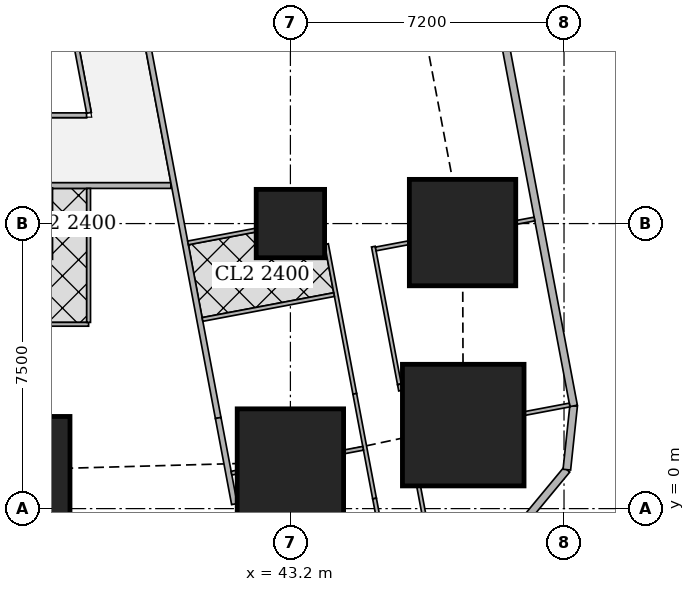
"""IFC4 building model, lengths in metres.
Left out: names, types, materials, properties, quantities, classifications, styles, units other than length and angle.
Written with IfcOpenShell. Run it as: python <this file> out.ifc"""

import sys

from ifc_helpers import new_model, si_unit, direction, frame, frame_2d, origin, origin_2d, place, context, subcontext, project, spatial, rectangle, extrude, element, fill, save


model = new_model("IFC4")
c1 = context("Model", 3, precision=1e-05, world=origin(), true_north=direction((0.0, 1.0)))
c2 = subcontext(c1, "Body", "Model", "MODEL_VIEW")
j1 = project(units=[si_unit("LENGTHUNIT", "METRE"), si_unit("PLANEANGLEUNIT", "RADIAN")], contexts=[c1])
p1 = place(None, origin())
s1 = spatial("IfcSite", under=j1, at=p1, CompositionType="ELEMENT")
p2 = place(p1, origin())
s2 = spatial("IfcBuilding", under=s1, at=p2, CompositionType="ELEMENT")
p3 = place(p2, frame((0.0, 0.0, 42.5)))
s3 = spatial("IfcBuildingStorey", under=s2, at=p3, CompositionType="ELEMENT", Elevation=42.5)
for number, where, z_axis, x_axis in (
    (1, (36.0, 1.025, 0.0), (0.0, 0.0, 1.0), (1.0, 0.0, 0.0)),
    (2, (43.2, 1.225, 0.0), (0.0, 0.0, 1.0), (1.0, 0.0, 0.0)),
):
    element("IfcColumn", number, at=place(p3, frame(where, z_axis=z_axis, x_axis=x_axis)), inside=s3, PredefinedType="COLUMN", context=c2, shape_type="SweptSolid", body=[
        extrude(rectangle(XDim=2.8, YDim=2.8, at=origin_2d()), origin(), (0.0, 0.0, 1.0), 3.75),
    ])
p4 = place(p3, frame((47.748, 2.197, 0.0), z_axis=(0.0, 0.0, 1.0), x_axis=(1.0, 0.0, 0.0)))
e3 = element("IfcColumn", 3, at=p4, inside=s3, PredefinedType="COLUMN", context=c2, shape_type="SweptSolid", body=[
    extrude(rectangle(XDim=3.2, YDim=3.2, at=origin_2d()), origin(), (0.0, 0.0, 1.0), 3.75),
])
p5 = place(p3, frame((43.2, 7.5, 0.0), z_axis=(0.0, 0.0, 1.0), x_axis=(1.0, 0.0, 0.0)))
e4 = element("IfcColumn", 4, at=p5, inside=s3, PredefinedType="COLUMN", context=c2, shape_type="SweptSolid", body=[
    extrude(rectangle(XDim=1.8, YDim=1.8, at=origin_2d()), origin(), (0.0, 0.0, 1.0), 3.75),
])
p6 = place(p3, frame((47.73, 7.263, 0.0), z_axis=(0.0, 0.0, 1.0), x_axis=(1.0, 0.0, 0.0)))
e5 = element("IfcColumn", 5, at=p6, inside=s3, PredefinedType="COLUMN", context=c2, shape_type="SweptSolid", body=[
    extrude(rectangle(XDim=2.8, YDim=2.8, at=origin_2d()), origin(), (0.0, 0.0, 1.0), 3.75),
])
p7 = place(p3, frame((49.407, -0.263, 0.0), z_axis=(0.0, 0.0, 1.0), x_axis=(0.638042593423, 0.770001070764, 0.0)))
e6 = element("IfcWall", 6, at=p7, inside=s3, PredefinedType="SOLIDWALL", context=c2, shape_type="SweptSolid", body=[
    extrude(rectangle(XDim=1.673, YDim=0.2, at=frame_2d((0.836, 0.0))), origin(), (0.0, 0.0, 1.0), 3.5),
])
p8 = place(p3, frame((50.474, 1.025, 0.0), z_axis=(0.0, 0.0, 1.0), x_axis=(0.106047815515, 0.994361031429, 0.0)))
e7 = element("IfcWall", 7, at=p8, inside=s3, PredefinedType="SOLIDWALL", context=c2, shape_type="SweptSolid", body=[
    extrude(rectangle(XDim=1.688, YDim=0.2, at=frame_2d((0.844, 0.0))), origin(), (0.0, 0.0, 1.0), 3.5),
])
p9 = place(p3, frame((50.653, 2.703, 0.0), z_axis=(0.0, 0.0, 1.0), x_axis=(-0.185612026696, 0.982623109613, 0.0)))
e8 = element("IfcWall", 8, at=p9, inside=s3, PredefinedType="SOLIDWALL", context=c2, shape_type="SweptSolid", body=[
    extrude(rectangle(XDim=41.393, YDim=0.2, at=frame_2d((20.697, 0.0))), origin(), (0.0, 0.0, 1.0), 3.5),
])
p10 = place(p9, frame((1.633, 0.0, 0.9)))
e9 = element("IfcOpeningElement", 9, at=p10, cuts=e8, PredefinedType="OPENING", context=c2, shape_type="SweptSolid", body=[
    extrude(rectangle(XDim=1.8, YDim=1.5, at=frame_2d((0.9, 0.75))), frame((0.0, 0.11, 0.0), z_axis=(0.0, -1.0, 0.0), x_axis=(1.0, 0.0, 0.0)), (0.0, 0.0, 1.0), 0.22),
])
p11 = place(p9, frame((6.032, 0.0, 0.9)))
e10 = element("IfcOpeningElement", 10, at=p11, cuts=e8, PredefinedType="OPENING", context=c2, shape_type="SweptSolid", body=[
    extrude(rectangle(XDim=1.8, YDim=1.5, at=frame_2d((0.9, 0.75))), frame((0.0, 0.11, 0.0), z_axis=(0.0, -1.0, 0.0), x_axis=(1.0, 0.0, 0.0)), (0.0, 0.0, 1.0), 0.22),
])
p12 = place(p9, frame((9.848, 0.0, 0.9)))
e11 = element("IfcOpeningElement", 11, at=p12, cuts=e8, PredefinedType="OPENING", context=c2, shape_type="SweptSolid", body=[
    extrude(rectangle(XDim=1.8, YDim=1.5, at=frame_2d((0.9, 0.75))), frame((0.0, 0.11, 0.0), z_axis=(0.0, -1.0, 0.0), x_axis=(1.0, 0.0, 0.0)), (0.0, 0.0, 1.0), 0.22),
])
p13 = place(p9, frame((17.481, 0.0, 0.9)))
e12 = element("IfcOpeningElement", 12, at=p13, cuts=e8, PredefinedType="OPENING", context=c2, shape_type="SweptSolid", body=[
    extrude(rectangle(XDim=1.8, YDim=1.5, at=frame_2d((0.9, 0.75))), frame((0.0, 0.11, 0.0), z_axis=(0.0, -1.0, 0.0), x_axis=(1.0, 0.0, 0.0)), (0.0, 0.0, 1.0), 0.22),
])
p14 = place(p9, frame((21.297, 0.0, 0.9)))
e13 = element("IfcOpeningElement", 13, at=p14, cuts=e8, PredefinedType="OPENING", context=c2, shape_type="SweptSolid", body=[
    extrude(rectangle(XDim=1.8, YDim=1.5, at=frame_2d((0.9, 0.75))), frame((0.0, 0.11, 0.0), z_axis=(0.0, -1.0, 0.0), x_axis=(1.0, 0.0, 0.0)), (0.0, 0.0, 1.0), 0.22),
])
p15 = place(p9, frame((25.113, 0.0, 0.9)))
e14 = element("IfcOpeningElement", 14, at=p15, cuts=e8, PredefinedType="OPENING", context=c2, shape_type="SweptSolid", body=[
    extrude(rectangle(XDim=1.8, YDim=1.5, at=frame_2d((0.9, 0.75))), frame((0.0, 0.11, 0.0), z_axis=(0.0, -1.0, 0.0), x_axis=(1.0, 0.0, 0.0)), (0.0, 0.0, 1.0), 0.22),
])
p16 = place(p9, frame((28.93, 0.0, 0.9)))
e15 = element("IfcOpeningElement", 15, at=p16, cuts=e8, PredefinedType="OPENING", context=c2, shape_type="SweptSolid", body=[
    extrude(rectangle(XDim=1.8, YDim=1.5, at=frame_2d((0.9, 0.75))), frame((0.0, 0.11, 0.0), z_axis=(0.0, -1.0, 0.0), x_axis=(1.0, 0.0, 0.0)), (0.0, 0.0, 1.0), 0.22),
])
p17 = place(p9, frame((32.746, 0.0, 0.9)))
e16 = element("IfcOpeningElement", 16, at=p17, cuts=e8, PredefinedType="OPENING", context=c2, shape_type="SweptSolid", body=[
    extrude(rectangle(XDim=1.8, YDim=1.5, at=frame_2d((0.9, 0.75))), frame((0.0, 0.11, 0.0), z_axis=(0.0, -1.0, 0.0), x_axis=(1.0, 0.0, 0.0)), (0.0, 0.0, 1.0), 0.22),
])
p18 = place(p9, frame((36.481, 0.0, 0.9)))
e17 = element("IfcOpeningElement", 17, at=p18, cuts=e8, PredefinedType="OPENING", context=c2, shape_type="SweptSolid", body=[
    extrude(rectangle(XDim=1.8, YDim=1.5, at=frame_2d((0.9, 0.75))), frame((0.0, 0.11, 0.0), z_axis=(0.0, -1.0, 0.0), x_axis=(1.0, 0.0, 0.0)), (0.0, 0.0, 1.0), 0.22),
])
p19 = place(p3, frame((40.054, 8.5, 0.0), z_axis=(0.0, 0.0, 1.0), x_axis=(-1.0, 0.0, 0.0)))
e18 = element("IfcWall", 18, at=p19, inside=s3, PredefinedType="SOLIDWALL", context=c2, shape_type="SweptSolid", body=[
    extrude(rectangle(XDim=31.704, YDim=0.15, at=frame_2d((15.852, 0.0))), origin(), (0.0, 0.0, 1.0), 3.5),
])
p20 = place(p19, frame((27.321, 0.0, 0.0)))
e19 = element("IfcOpeningElement", 19, at=p20, cuts=e18, PredefinedType="OPENING", context=c2, shape_type="SweptSolid", body=[
    extrude(rectangle(XDim=1.0, YDim=2.1, at=frame_2d((0.5, 1.05))), frame((0.0, 0.085, 0.0), z_axis=(0.0, -1.0, 0.0), x_axis=(1.0, 0.0, 0.0)), (0.0, 0.0, 1.0), 0.17),
])
p21 = place(p19, frame((23.054, 0.0, 0.0)))
e20 = element("IfcOpeningElement", 20, at=p21, cuts=e18, PredefinedType="OPENING", context=c2, shape_type="SweptSolid", body=[
    extrude(rectangle(XDim=1.0, YDim=2.1, at=frame_2d((0.5, 1.05))), frame((0.0, 0.085, 0.0), z_axis=(0.0, -1.0, 0.0), x_axis=(1.0, 0.0, 0.0)), (0.0, 0.0, 1.0), 0.17),
])
p22 = place(p19, frame((15.854, 0.0, 0.0)))
e21 = element("IfcOpeningElement", 21, at=p22, cuts=e18, PredefinedType="OPENING", context=c2, shape_type="SweptSolid", body=[
    extrude(rectangle(XDim=1.0, YDim=2.1, at=frame_2d((0.5, 1.05))), frame((0.0, 0.085, 0.0), z_axis=(0.0, -1.0, 0.0), x_axis=(1.0, 0.0, 0.0)), (0.0, 0.0, 1.0), 0.17),
])
p23 = place(p19, frame((8.654, 0.0, 0.0)))
e22 = element("IfcOpeningElement", 22, at=p23, cuts=e18, PredefinedType="OPENING", context=c2, shape_type="SweptSolid", body=[
    extrude(rectangle(XDim=1.0, YDim=2.1, at=frame_2d((0.5, 1.05))), frame((0.0, 0.085, 0.0), z_axis=(0.0, -1.0, 0.0), x_axis=(1.0, 0.0, 0.0)), (0.0, 0.0, 1.0), 0.17),
])
p24 = place(p19, frame((0.15, 0.0, 0.0)))
e23 = element("IfcOpeningElement", 23, at=p24, cuts=e18, PredefinedType="OPENING", context=c2, shape_type="SweptSolid", body=[
    extrude(rectangle(XDim=1.0, YDim=2.1, at=frame_2d((0.5, 1.05))), frame((0.0, 0.085, 0.0), z_axis=(0.0, -1.0, 0.0), x_axis=(1.0, 0.0, 0.0)), (0.0, 0.0, 1.0), 0.17),
])
p25 = place(p3, frame((33.68, 42.723, 0.0), z_axis=(0.0, 0.0, 1.0), x_axis=(0.185624129307, -0.98262082342, 0.0)))
e24 = element("IfcWall", 24, at=p25, inside=s3, PredefinedType="SOLIDWALL", context=c2, shape_type="SweptSolid", body=[
    extrude(rectangle(XDim=41.051, YDim=0.15, at=frame_2d((20.526, 0.0))), origin(), (0.0, 0.0, 1.0), 2.5),
])
p26 = place(p25, frame((7.73, 0.0, 0.0)))
e25 = element("IfcOpeningElement", 25, at=p26, cuts=e24, PredefinedType="OPENING", context=c2, shape_type="SweptSolid", body=[
    extrude(rectangle(XDim=1.0, YDim=2.1, at=frame_2d((0.5, 1.05))), frame((0.0, 0.085, 0.0), z_axis=(0.0, -1.0, 0.0), x_axis=(1.0, 0.0, 0.0)), (0.0, 0.0, 1.0), 0.17),
])
p27 = place(p25, frame((12.307, 0.0, 0.0)))
e26 = element("IfcOpeningElement", 26, at=p27, cuts=e24, PredefinedType="OPENING", context=c2, shape_type="SweptSolid", body=[
    extrude(rectangle(XDim=1.0, YDim=2.1, at=frame_2d((0.5, 1.05))), frame((0.0, 0.085, 0.0), z_axis=(0.0, -1.0, 0.0), x_axis=(1.0, 0.0, 0.0)), (0.0, 0.0, 1.0), 0.17),
])
p28 = place(p25, frame((19.938, 0.0, 0.0)))
e27 = element("IfcOpeningElement", 27, at=p28, cuts=e24, PredefinedType="OPENING", context=c2, shape_type="SweptSolid", body=[
    extrude(rectangle(XDim=1.0, YDim=2.1, at=frame_2d((0.5, 1.05))), frame((0.0, 0.085, 0.0), z_axis=(0.0, -1.0, 0.0), x_axis=(1.0, 0.0, 0.0)), (0.0, 0.0, 1.0), 0.17),
])
p29 = place(p25, frame((32.193, 0.0, 0.0)))
e28 = element("IfcOpeningElement", 28, at=p29, cuts=e24, PredefinedType="OPENING", context=c2, shape_type="SweptSolid", body=[
    extrude(rectangle(XDim=1.0, YDim=2.1, at=frame_2d((0.5, 1.05))), frame((0.0, 0.085, 0.0), z_axis=(0.0, -1.0, 0.0), x_axis=(1.0, 0.0, 0.0)), (0.0, 0.0, 1.0), 0.17),
])
p30 = place(p3, frame((41.3, 2.385, 0.0), z_axis=(0.0, 0.0, 1.0), x_axis=(0.185170596553, -0.982706390624, 0.0)))
e29 = element("IfcWall", 29, at=p30, inside=s3, PredefinedType="SOLIDWALL", context=c2, shape_type="SweptSolid", body=[
    extrude(rectangle(XDim=2.306, YDim=0.15, at=frame_2d((1.153, 0.0))), origin(), (0.0, 0.0, 1.0), 2.05),
])
p31 = place(p3, frame((37.89, 4.85, 0.0), z_axis=(0.0, 0.0, 1.0), x_axis=(-1.0, 0.0, 0.0)))
e30 = element("IfcWall", 30, at=p31, inside=s3, PredefinedType="PARTITIONING", context=c2, shape_type="SweptSolid", body=[
    extrude(rectangle(XDim=1.765, YDim=0.1, at=frame_2d((0.882, 0.0))), origin(), (0.0, 0.0, 1.0), 3.5),
])
p32 = place(p31, frame((0.49, 0.0, 0.0)))
e31 = element("IfcOpeningElement", 31, at=p32, cuts=e30, PredefinedType="OPENING", context=c2, shape_type="SweptSolid", body=[
    extrude(rectangle(XDim=0.9, YDim=2.1, at=frame_2d((0.45, 1.05))), frame((0.0, 0.06, 0.0), z_axis=(0.0, -1.0, 0.0), x_axis=(1.0, 0.0, 0.0)), (0.0, 0.0, 1.0), 0.12),
])
p33 = place(p3, frame((37.89, 4.9, 0.0), z_axis=(0.0, 0.0, 1.0), x_axis=(0.0, 1.0, 0.0)))
e32 = element("IfcWall", 32, at=p33, inside=s3, PredefinedType="PARTITIONING", context=c2, shape_type="SweptSolid", body=[
    extrude(rectangle(XDim=3.525, YDim=0.1, at=frame_2d((1.763, 0.0))), origin(), (0.0, 0.0, 1.0), 3.5),
])
p34 = place(p3, frame((45.383, 6.894, 0.0), z_axis=(0.0, 0.0, 1.0), x_axis=(0.185791461635, -0.982589198385, 0.0)))
e33 = element("IfcWall", 33, at=p34, inside=s3, PredefinedType="PARTITIONING", context=c2, shape_type="SweptSolid", body=[
    extrude(rectangle(XDim=3.687, YDim=0.1, at=frame_2d((1.844, 0.0))), origin(), (0.0, 0.0, 1.0), 3.5),
])
p35 = place(p34, frame((1.3, 0.0, 0.0)))
e34 = element("IfcOpeningElement", 34, at=p35, cuts=e33, PredefinedType="OPENING", context=c2, shape_type="SweptSolid", body=[
    extrude(rectangle(XDim=0.9, YDim=2.1, at=frame_2d((0.45, 1.05))), frame((0.0, 0.06, 0.0), z_axis=(0.0, -1.0, 0.0), x_axis=(1.0, 0.0, 0.0)), (0.0, 0.0, 1.0), 0.12),
])
p36 = place(p3, frame((46.068, 3.271, 0.0), z_axis=(0.0, 0.0, 1.0), x_axis=(0.183590240121, -0.98300286049, 0.0)))
e35 = element("IfcWall", 35, at=p36, inside=s3, PredefinedType="PARTITIONING", context=c2, shape_type="SweptSolid", body=[
    extrude(rectangle(XDim=0.169, YDim=0.1, at=frame_2d((0.084, 0.0))), origin(), (0.0, 0.0, 1.0), 2.05),
])
p37 = place(p3, frame((46.574, 0.587, 0.0), z_axis=(0.0, 0.0, 1.0), x_axis=(0.185997942803, -0.98255013372, 0.0)))
e36 = element("IfcWall", 36, at=p37, inside=s3, PredefinedType="PARTITIONING", context=c2, shape_type="SweptSolid", body=[
    extrude(rectangle(XDim=1.259, YDim=0.1, at=frame_2d((0.629, 0.0))), origin(), (0.0, 0.0, 1.0), 2.05),
])
p38 = place(p3, frame((44.149, 6.96, 0.0), z_axis=(0.0, 0.0, 1.0), x_axis=(0.185824941804, -0.982582867245, 0.0)))
e37 = element("IfcWall", 37, at=p38, inside=s3, PredefinedType="PARTITIONING", context=c2, shape_type="SweptSolid", body=[
    extrude(rectangle(XDim=4.01, YDim=0.1, at=frame_2d((2.005, 0.0))), origin(), (0.0, 0.0, 1.0), 3.5),
])
p39 = place(p38, frame((0.2, 0.0, 0.0)))
e38 = element("IfcOpeningElement", 38, at=p39, cuts=e37, PredefinedType="OPENING", context=c2, shape_type="SweptSolid", body=[
    extrude(rectangle(XDim=0.9, YDim=2.1, at=frame_2d((0.45, 1.05))), frame((0.0, 0.06, 0.0), z_axis=(0.0, -1.0, 0.0), x_axis=(1.0, 0.0, 0.0)), (0.0, 0.0, 1.0), 0.12),
])
p40 = place(p38, frame((1.776, 0.0, 0.0)))
e39 = element("IfcOpeningElement", 39, at=p40, cuts=e37, PredefinedType="OPENING", context=c2, shape_type="SweptSolid", body=[
    extrude(rectangle(XDim=0.9, YDim=2.1, at=frame_2d((0.45, 1.05))), frame((0.0, 0.06, 0.0), z_axis=(0.0, -1.0, 0.0), x_axis=(1.0, 0.0, 0.0)), (0.0, 0.0, 1.0), 0.12),
])
p41 = place(p3, frame((44.894, 3.02, 0.0), z_axis=(0.0, 0.0, 1.0), x_axis=(0.185471317237, -0.982649678412, 0.0)))
e40 = element("IfcWall", 40, at=p41, inside=s3, PredefinedType="PARTITIONING", context=c2, shape_type="SweptSolid", body=[
    extrude(rectangle(XDim=2.804, YDim=0.1, at=frame_2d((1.402, 0.0))), origin(), (0.0, 0.0, 1.0), 2.05),
])
p42 = place(p3, frame((45.414, 0.265, 0.0), z_axis=(0.0, 0.0, 1.0), x_axis=(0.185665855771, -0.982612940074, 0.0)))
e41 = element("IfcWall", 41, at=p42, inside=s3, PredefinedType="PARTITIONING", context=c2, shape_type="SweptSolid", body=[
    extrude(rectangle(XDim=0.931, YDim=0.1, at=frame_2d((0.465, 0.0))), origin(), (0.0, 0.0, 1.0), 3.5),
])
p43 = place(p3, frame((49.622, 7.62, 0.0), z_axis=(0.0, 0.0, 1.0), x_axis=(-0.982629142467, -0.185580086147, 0.0)))
e42 = element("IfcWall", 42, at=p43, inside=s3, PredefinedType="PARTITIONING", context=c2, shape_type="SweptSolid", body=[
    extrude(rectangle(XDim=0.491, YDim=0.1, at=frame_2d((0.245, 0.0))), origin(), (0.0, 0.0, 1.0), 3.5),
])
p44 = place(p3, frame((46.32, 6.997, 0.0), z_axis=(0.0, 0.0, 1.0), x_axis=(-0.982635224332, -0.185547880349, 0.0)))
e43 = element("IfcWall", 43, at=p44, inside=s3, PredefinedType="PARTITIONING", context=c2, shape_type="SweptSolid", body=[
    extrude(rectangle(XDim=0.889, YDim=0.1, at=frame_2d((0.445, 0.0))), origin(), (0.0, 0.0, 1.0), 3.5),
])
p45 = place(p3, frame((50.547, 2.726, 0.0), z_axis=(0.0, 0.0, 1.0), x_axis=(-0.982553313503, -0.185981144539, 0.0)))
e44 = element("IfcWall", 44, at=p45, inside=s3, PredefinedType="PARTITIONING", context=c2, shape_type="SweptSolid", body=[
    extrude(rectangle(XDim=1.21, YDim=0.1, at=frame_2d((0.605, 0.0))), origin(), (0.0, 0.0, 1.0), 3.5),
])
p46 = place(p3, frame((42.29, 7.328, 0.0), z_axis=(0.0, 0.0, 1.0), x_axis=(-0.98262927905, -0.185579362952, 0.0)))
e45 = element("IfcWall", 45, at=p46, inside=s3, PredefinedType="PARTITIONING", context=c2, shape_type="SweptSolid", body=[
    extrude(rectangle(XDim=1.815, YDim=0.1, at=frame_2d((0.908, 0.0))), origin(), (0.0, 0.0, 1.0), 3.5),
])
p47 = place(p3, frame((45.114, 1.587, 0.0), z_axis=(0.0, 0.0, 1.0), x_axis=(-0.982699277433, -0.185208342501, 0.0)))
e46 = element("IfcWall", 46, at=p47, inside=s3, PredefinedType="PARTITIONING", context=c2, shape_type="SweptSolid", body=[
    extrude(rectangle(XDim=0.513, YDim=0.1, at=frame_2d((0.256, 0.0))), origin(), (0.0, 0.0, 1.0), 2.05),
])
p48 = place(p3, frame((41.79, 0.959, 0.0), z_axis=(0.0, 0.0, 1.0), x_axis=(-0.983372768072, -0.181598455428, 0.0)))
e47 = element("IfcWall", 47, at=p48, inside=s3, PredefinedType="PARTITIONING", context=c2, shape_type="SweptSolid", body=[
    extrude(rectangle(XDim=0.143, YDim=0.1, at=frame_2d((0.071, 0.0))), origin(), (0.0, 0.0, 1.0), 2.05),
])
p49 = place(p3, frame((44.349, 5.631, 0.0), z_axis=(0.0, 0.0, 1.0), x_axis=(-0.982629014545, -0.18558076348, 0.0)))
e48 = element("IfcWall", 48, at=p49, inside=s3, PredefinedType="PARTITIONING", context=c2, shape_type="SweptSolid", body=[
    extrude(rectangle(XDim=3.524, YDim=0.1, at=frame_2d((1.762, 0.0))), origin(), (0.0, 0.0, 1.0), 3.5),
])
p50 = place(p3, frame((28.95, 10.35, 0.0), z_axis=(0.0, 0.0, 1.0), x_axis=(1.0, 0.0, 0.0)))
e49 = element("IfcWall", 49, at=p50, inside=s3, PredefinedType="PARTITIONING", context=c2, shape_type="SweptSolid", body=[
    extrude(rectangle(XDim=8.886, YDim=0.125, at=frame_2d((4.443, 0.0))), origin(), (0.0, 0.0, 1.0), 3.5),
])
p51 = place(p3, frame((37.9, 10.413, 0.0), z_axis=(0.0, 0.0, 1.0), x_axis=(-0.185527510388, 0.982639070508, 0.0)))
e50 = element("IfcWall", 50, at=p51, inside=s3, PredefinedType="PARTITIONING", context=c2, shape_type="SweptSolid", body=[
    extrude(rectangle(XDim=5.056, YDim=0.125, at=frame_2d((2.528, 0.0))), origin(), (0.0, 0.0, 1.0), 3.5),
])
p52 = place(p51, frame((0.708, 0.0, 0.0)))
e51 = element("IfcOpeningElement", 51, at=p52, cuts=e50, PredefinedType="OPENING", context=c2, shape_type="SweptSolid", body=[
    extrude(rectangle(XDim=1.0, YDim=2.1, at=frame_2d((0.5, 1.05))), frame((0.0, 0.073, 0.0), z_axis=(0.0, -1.0, 0.0), x_axis=(1.0, 0.0, 0.0)), (0.0, 0.0, 1.0), 0.145),
])
p53 = place(p10, origin())
e52 = element("IfcWindow", 52, at=p53, inside=s3, PartitioningType="SINGLE_PANEL", PredefinedType="WINDOW", context=c2, shape_type="SweptSolid", body=[
    extrude(rectangle(XDim=1.8, YDim=1.5, at=frame_2d((0.9, 0.75))), frame((0.0, 0.03, 0.0), z_axis=(0.0, -1.0, 0.0), x_axis=(1.0, 0.0, 0.0)), (0.0, 0.0, 1.0), 0.06),
])
fill(e9, e52)
p54 = place(p11, origin())
e53 = element("IfcWindow", 53, at=p54, inside=s3, PartitioningType="SINGLE_PANEL", PredefinedType="WINDOW", context=c2, shape_type="SweptSolid", body=[
    extrude(rectangle(XDim=1.8, YDim=1.5, at=frame_2d((0.9, 0.75))), frame((0.0, 0.03, 0.0), z_axis=(0.0, -1.0, 0.0), x_axis=(1.0, 0.0, 0.0)), (0.0, 0.0, 1.0), 0.06),
])
fill(e10, e53)
p55 = place(p32, origin())
e54 = element("IfcDoor", 54, at=p55, inside=s3, OperationType="SINGLE_SWING_LEFT", PredefinedType="DOOR", context=c2, shape_type="SweptSolid", body=[
    extrude(rectangle(XDim=0.9, YDim=2.1, at=frame_2d((0.45, 1.05))), frame((0.0, 0.025, 0.0), z_axis=(0.0, -1.0, 0.0), x_axis=(1.0, 0.0, 0.0)), (0.0, 0.0, 1.0), 0.05),
])
fill(e31, e54)
p56 = place(p24, origin())
e55 = element("IfcDoor", 55, at=p56, inside=s3, OperationType="SINGLE_SWING_LEFT", PredefinedType="DOOR", context=c2, shape_type="SweptSolid", body=[
    extrude(rectangle(XDim=1.0, YDim=2.1, at=frame_2d((0.5, 1.05))), frame((0.0, 0.025, 0.0), z_axis=(0.0, -1.0, 0.0), x_axis=(1.0, 0.0, 0.0)), (0.0, 0.0, 1.0), 0.05),
])
fill(e23, e55)
p57 = place(p35, origin())
e56 = element("IfcDoor", 56, at=p57, inside=s3, OperationType="SINGLE_SWING_LEFT", PredefinedType="DOOR", context=c2, shape_type="SweptSolid", body=[
    extrude(rectangle(XDim=0.9, YDim=2.1, at=frame_2d((0.45, 1.05))), frame((0.0, 0.025, 0.0), z_axis=(0.0, -1.0, 0.0), x_axis=(1.0, 0.0, 0.0)), (0.0, 0.0, 1.0), 0.05),
])
fill(e34, e56)
p58 = place(p39, origin())
e57 = element("IfcDoor", 57, at=p58, inside=s3, OperationType="SINGLE_SWING_LEFT", PredefinedType="DOOR", context=c2, shape_type="SweptSolid", body=[
    extrude(rectangle(XDim=0.9, YDim=2.1, at=frame_2d((0.45, 1.05))), frame((0.0, 0.025, 0.0), z_axis=(0.0, -1.0, 0.0), x_axis=(1.0, 0.0, 0.0)), (0.0, 0.0, 1.0), 0.05),
])
fill(e38, e57)
p59 = place(p40, origin())
e58 = element("IfcDoor", 58, at=p59, inside=s3, OperationType="SINGLE_SWING_RIGHT", PredefinedType="DOOR", context=c2, shape_type="SweptSolid", body=[
    extrude(rectangle(XDim=0.9, YDim=2.1, at=frame_2d((0.45, 1.05))), frame((0.0, 0.025, 0.0), z_axis=(0.0, -1.0, 0.0), x_axis=(1.0, 0.0, 0.0)), (0.0, 0.0, 1.0), 0.05),
])
fill(e39, e58)
p60 = place(p29, origin())
e59 = element("IfcDoor", 59, at=p60, inside=s3, OperationType="SINGLE_SWING_RIGHT", PredefinedType="DOOR", context=c2, shape_type="SweptSolid", body=[
    extrude(rectangle(XDim=1.0, YDim=2.1, at=frame_2d((0.5, 1.05))), frame((0.0, 0.025, 0.0), z_axis=(0.0, -1.0, 0.0), x_axis=(1.0, 0.0, 0.0)), (0.0, 0.0, 1.0), 0.05),
])
fill(e28, e59)
p61 = place(p52, origin())
e60 = element("IfcDoor", 60, at=p61, inside=s3, OperationType="SINGLE_SWING_LEFT", PredefinedType="DOOR", context=c2, shape_type="SweptSolid", body=[
    extrude(rectangle(XDim=1.0, YDim=2.1, at=frame_2d((0.5, 1.05))), frame((0.0, 0.025, 0.0), z_axis=(0.0, -1.0, 0.0), x_axis=(1.0, 0.0, 0.0)), (0.0, 0.0, 1.0), 0.05),
])
fill(e51, e60)
save(model, sys.argv[1])
